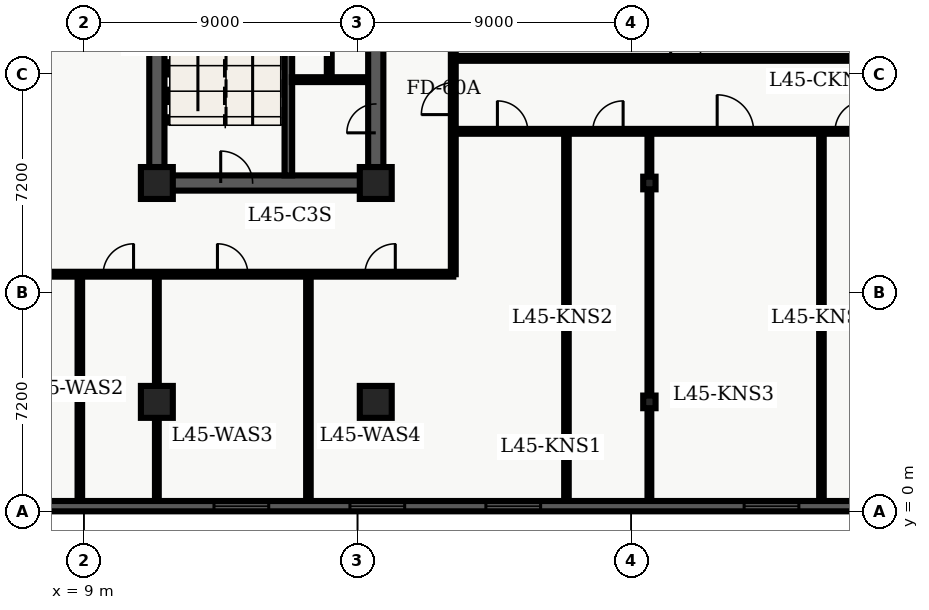
"""IFC4 building model, lengths in metres.
Left out: names, types, materials, properties, quantities, classifications, styles, units other than length and angle.
Written with IfcOpenShell. Run it as: python <this file> out.ifc"""

import sys

from ifc_helpers import new_model, entity, si_unit, converted_unit, direction, frame, origin_with_axes, origin_2d_with_axis, place, context, subcontext, project, spatial, polyline, rectangle, i_section, outline, extrude, element, fill, save


model = new_model("IFC4")
c1 = context("Model", 3, precision=1e-05, world=origin_with_axes(), true_north=direction((0.0, 1.0)))
c2 = subcontext(c1, "Body", "Model", "MODEL_VIEW")
j1 = project(units=[si_unit("LENGTHUNIT", "METRE"), converted_unit("PLANEANGLEUNIT", "DEGREE", entity("IfcPlaneAngleMeasure", 0.017), si_unit("PLANEANGLEUNIT", "RADIAN"), dimensions=[0, 0, 0, 0, 0, 0, 0])], contexts=[c1])
p1 = place(None, origin_with_axes())
s1 = spatial("IfcSite", under=j1, at=p1, CompositionType="ELEMENT")
p2 = place(p1, origin_with_axes())
s2 = spatial("IfcBuilding", under=s1, at=p2, CompositionType="ELEMENT")
p3 = place(p2, frame((0.0, 0.0, 183.6), z_axis=(0.0, 0.0, 1.0), x_axis=(1.0, 0.0, 0.0)))
s3 = spatial("IfcBuildingStorey", under=s2, at=p3, CompositionType="ELEMENT", Elevation=183.6)
p4 = place(p3, frame((11.4, 10.8, 0.0), z_axis=(0.0, 0.0, 1.0), x_axis=(0.0, 1.0, 0.0)))
e1 = element("IfcWall", 1, at=p4, inside=s3, PredefinedType="SHEAR", context=c2, shape_type="SweptSolid", body=[
    extrude(outline(polyline([(0.0, -0.25), (27.0, -0.25), (27.0, 0.25), (0.0, 0.25), (0.0, -0.25)])), origin_with_axes(), (0.0, 0.0, 1.0), 3.6),
])
p5 = place(p3, frame((11.4, 10.8, 0.0), z_axis=(0.0, 0.0, 1.0), x_axis=(1.0, 0.0, 0.0)))
e2 = element("IfcWall", 2, at=p5, inside=s3, PredefinedType="SHEAR", context=c2, shape_type="SweptSolid", body=[
    extrude(outline(polyline([(0.0, -0.25), (7.2, -0.25), (7.2, 0.25), (0.0, 0.25), (0.0, -0.25)])), origin_with_axes(), (0.0, 0.0, 1.0), 3.6),
])
p6 = place(p5, frame((2.625, 0.0, 0.0), z_axis=(0.0, 0.0, 1.0), x_axis=(1.0, 0.0, 0.0)))
e3 = element("IfcOpeningElement", 3, at=p6, cuts=e2, PredefinedType="OPENING", context=c2, shape_type="SweptSolid", body=[
    extrude(rectangle(XDim=1.05, YDim=0.52, at=origin_2d_with_axis()), origin_with_axes(), (0.0, 0.0, 1.0), 2.15),
])
p7 = place(p3, frame((18.6, 10.8, 0.0), z_axis=(0.0, 0.0, 1.0), x_axis=(0.0, 1.0, 0.0)))
e4 = element("IfcWall", 4, at=p7, inside=s3, PredefinedType="SHEAR", context=c2, shape_type="SweptSolid", body=[
    extrude(outline(polyline([(0.0, -0.25), (13.5, -0.25), (13.5, 0.25), (0.0, 0.25), (0.0, -0.25)])), origin_with_axes(), (0.0, 0.0, 1.0), 3.6),
])
p8 = place(p7, frame((11.125, 0.0, 0.0), z_axis=(0.0, 0.0, 1.0), x_axis=(1.0, 0.0, 0.0)))
e5 = element("IfcOpeningElement", 5, at=p8, cuts=e4, PredefinedType="OPENING", context=c2, shape_type="SweptSolid", body=[
    extrude(rectangle(XDim=1.05, YDim=0.52, at=origin_2d_with_axis()), origin_with_axes(), (0.0, 0.0, 1.0), 2.15),
])
p9 = place(p7, frame((2.125, 0.0, 0.0), z_axis=(0.0, 0.0, 1.0), x_axis=(1.0, 0.0, 0.0)))
e6 = element("IfcOpeningElement", 6, at=p9, cuts=e4, PredefinedType="OPENING", context=c2, shape_type="SweptSolid", body=[
    extrude(rectangle(XDim=0.95, YDim=0.52, at=origin_2d_with_axis()), origin_with_axes(), (0.0, 0.0, 1.0), 2.15),
])
p10 = place(p7, frame((6.275, 0.0, 0.0), z_axis=(0.0, 0.0, 1.0), x_axis=(1.0, 0.0, 0.0)))
e7 = element("IfcOpeningElement", 7, at=p10, cuts=e4, PredefinedType="OPENING", context=c2, shape_type="SweptSolid", body=[
    extrude(rectangle(XDim=0.95, YDim=0.52, at=origin_2d_with_axis()), origin_with_axes(), (0.0, 0.0, 1.0), 2.15),
])
p11 = place(p3, frame((15.725, 11.05, 0.0), z_axis=(0.0, 0.0, 1.0), x_axis=(0.0, 1.0, 0.0)))
e8 = element("IfcWall", 8, at=p11, inside=s3, PredefinedType="SHEAR", context=c2, shape_type="SweptSolid", body=[
    extrude(outline(polyline([(0.0, -0.125), (8.65, -0.125), (8.65, 0.125), (0.0, 0.125), (0.0, -0.125)])), origin_with_axes(), (0.0, 0.0, 1.0), 3.6),
])
for number, where, z_axis, x_axis in (
    (9, (11.4, 3.6, 0.0), (0.0, 0.0, 1.0), (1.0, 0.0, 0.0)),
    (10, (11.4, 10.8, 0.0), (0.0, 0.0, 1.0), (1.0, 0.0, 0.0)),
    (11, (18.6, 3.6, 0.0), (0.0, 0.0, 1.0), (1.0, 0.0, 0.0)),
    (12, (18.6, 10.8, 0.0), (0.0, 0.0, 1.0), (1.0, 0.0, 0.0)),
):
    element("IfcColumn", number, at=place(p3, frame(where, z_axis=z_axis, x_axis=x_axis)), inside=s3, PredefinedType="COLUMN", context=c2, shape_type="SweptSolid", body=[
        extrude(rectangle(XDim=1.05, YDim=1.05, at=origin_2d_with_axis()), origin_with_axes(), (0.0, 0.0, 1.0), 3.9),
    ])
for number, where, z_axis, x_axis in (
    (13, (27.6, 3.6, 0.0), (0.0, 0.0, 1.0), (1.0, 0.0, 0.0)),
    (14, (27.6, 10.8, 0.0), (0.0, 0.0, 1.0), (1.0, 0.0, 0.0)),
):
    element("IfcColumn", number, at=place(p3, frame(where, z_axis=z_axis, x_axis=x_axis)), inside=s3, PredefinedType="COLUMN", context=c2, shape_type="SweptSolid", body=[
        extrude(i_section(OverallWidth=0.406, OverallDepth=0.416, WebThickness=0.03, FlangeThickness=0.048, FilletRadius=0.022, at=origin_2d_with_axis()), origin_with_axes(), (0.0, 0.0, 1.0), 3.9),
    ])
p12 = place(p3, frame((15.84, 14.2, 0.0), z_axis=(0.0, 0.0, 1.0), x_axis=(1.0, 0.0, 0.0)))
e15 = element("IfcWall", 15, at=p12, inside=s3, PredefinedType="PARTITIONING", context=c2, shape_type="SweptSolid", body=[
    extrude(outline(polyline([(0.0, -0.08), (2.46, -0.08), (2.46, 0.08), (0.0, 0.08), (0.0, -0.08)])), origin_with_axes(), (0.0, 0.0, 1.0), 2.64),
])
p13 = place(p3, frame((17.07, 14.28, 0.0), z_axis=(0.0, 0.0, 1.0), x_axis=(0.0, 1.0, 0.0)))
e16 = element("IfcWall", 16, at=p13, inside=s3, PredefinedType="PARTITIONING", context=c2, shape_type="SweptSolid", body=[
    extrude(outline(polyline([(0.0, -0.08), (5.42, -0.08), (5.42, 0.08), (0.0, 0.08), (0.0, -0.08)])), origin_with_axes(), (0.0, 0.0, 1.0), 2.64),
])
p14 = place(p13, frame((2.6, 0.0, 0.0), z_axis=(0.0, 0.0, 1.0), x_axis=(1.0, 0.0, 0.0)))
e17 = element("IfcOpeningElement", 17, at=p14, cuts=e16, PredefinedType="OPENING", context=c2, shape_type="SweptSolid", body=[
    extrude(rectangle(XDim=0.9, YDim=0.18, at=origin_2d_with_axis()), origin_with_axes(), (0.0, 0.0, 1.0), 2.15),
])
p15 = place(p3, frame((2.6, 7.8, 0.0), z_axis=(0.0, 0.0, 1.0), x_axis=(1.0, 0.0, 0.0)))
e18 = element("IfcWall", 18, at=p15, inside=s3, PredefinedType="PARTITIONING", context=c2, shape_type="SweptSolid", body=[
    extrude(outline(polyline([(0.0, -0.08), (18.55, -0.08), (18.55, 0.08), (0.0, 0.08), (0.0, -0.08)])), origin_with_axes(), (0.0, 0.0, 1.0), 2.64),
])
p16 = place(p15, frame((2.569, 0.0, 0.0), z_axis=(0.0, 0.0, 1.0), x_axis=(1.0, 0.0, 0.0)))
e19 = element("IfcOpeningElement", 19, at=p16, cuts=e18, PredefinedType="OPENING", context=c2, shape_type="SweptSolid", body=[
    extrude(rectangle(XDim=1.0, YDim=0.18, at=origin_2d_with_axis()), origin_with_axes(), (0.0, 0.0, 1.0), 2.15),
])
p17 = place(p15, frame((7.534, 0.0, 0.0), z_axis=(0.0, 0.0, 1.0), x_axis=(1.0, 0.0, 0.0)))
e20 = element("IfcOpeningElement", 20, at=p17, cuts=e18, PredefinedType="OPENING", context=c2, shape_type="SweptSolid", body=[
    extrude(rectangle(XDim=1.0, YDim=0.18, at=origin_2d_with_axis()), origin_with_axes(), (0.0, 0.0, 1.0), 2.15),
])
p18 = place(p15, frame((11.293, 0.0, 0.0), z_axis=(0.0, 0.0, 1.0), x_axis=(1.0, 0.0, 0.0)))
e21 = element("IfcOpeningElement", 21, at=p18, cuts=e18, PredefinedType="OPENING", context=c2, shape_type="SweptSolid", body=[
    extrude(rectangle(XDim=1.0, YDim=0.18, at=origin_2d_with_axis()), origin_with_axes(), (0.0, 0.0, 1.0), 2.15),
])
p19 = place(p15, frame((16.142, 0.0, 0.0), z_axis=(0.0, 0.0, 1.0), x_axis=(1.0, 0.0, 0.0)))
e22 = element("IfcOpeningElement", 22, at=p19, cuts=e18, PredefinedType="OPENING", context=c2, shape_type="SweptSolid", body=[
    extrude(rectangle(XDim=1.0, YDim=0.18, at=origin_2d_with_axis()), origin_with_axes(), (0.0, 0.0, 1.0), 2.15),
])
p20 = place(p3, frame((21.15, 7.8, 0.0), z_axis=(0.0, 0.0, 1.0), x_axis=(0.0, 1.0, 0.0)))
e23 = element("IfcWall", 23, at=p20, inside=s3, PredefinedType="PARTITIONING", context=c2, shape_type="SweptSolid", body=[
    extrude(outline(polyline([(0.0, -0.08), (32.7, -0.08), (32.7, 0.08), (0.0, 0.08), (0.0, -0.08)])), origin_with_axes(), (0.0, 0.0, 1.0), 2.64),
])
p21 = place(p20, frame((16.456, 0.0, 0.0), z_axis=(0.0, 0.0, 1.0), x_axis=(1.0, 0.0, 0.0)))
e24 = element("IfcOpeningElement", 24, at=p21, cuts=e23, PredefinedType="OPENING", context=c2, shape_type="SweptSolid", body=[
    extrude(rectangle(XDim=1.0, YDim=0.18, at=origin_2d_with_axis()), origin_with_axes(), (0.0, 0.0, 1.0), 2.15),
])
p22 = place(p20, frame((22.009, 0.0, 0.0), z_axis=(0.0, 0.0, 1.0), x_axis=(1.0, 0.0, 0.0)))
e25 = element("IfcOpeningElement", 25, at=p22, cuts=e23, PredefinedType="OPENING", context=c2, shape_type="SweptSolid", body=[
    extrude(rectangle(XDim=1.0, YDim=0.18, at=origin_2d_with_axis()), origin_with_axes(), (0.0, 0.0, 1.0), 2.15),
])
p23 = place(p20, frame((28.803, 0.0, 0.0), z_axis=(0.0, 0.0, 1.0), x_axis=(1.0, 0.0, 0.0)))
e26 = element("IfcOpeningElement", 26, at=p23, cuts=e23, PredefinedType="OPENING", context=c2, shape_type="SweptSolid", body=[
    extrude(rectangle(XDim=1.0, YDim=0.18, at=origin_2d_with_axis()), origin_with_axes(), (0.0, 0.0, 1.0), 2.15),
])
p24 = place(p20, frame((5.775, 0.0, 0.0), z_axis=(0.0, 0.0, 1.0), x_axis=(1.0, 0.0, 0.0)))
e27 = element("IfcOpeningElement", 27, at=p24, cuts=e23, PredefinedType="OPENING", context=c2, shape_type="SweptSolid", body=[
    extrude(rectangle(XDim=1.05, YDim=0.18, at=origin_2d_with_axis()), origin_with_axes(), (0.0, 0.0, 1.0), 2.15),
])
p25 = place(p3, frame((8.867, 0.335, 0.0), z_axis=(0.0, 0.0, 1.0), x_axis=(0.0, 1.0, 0.0)))
e28 = element("IfcWall", 28, at=p25, inside=s3, PredefinedType="PARTITIONING", context=c2, shape_type="SweptSolid", body=[
    extrude(outline(polyline([(0.0, -0.075), (7.365, -0.075), (7.365, 0.075), (0.0, 0.075), (0.0, -0.075)])), origin_with_axes(), (0.0, 0.0, 1.0), 2.64),
])
p26 = place(p3, frame((11.4, 0.335, 0.0), z_axis=(0.0, 0.0, 1.0), x_axis=(0.0, 1.0, 0.0)))
e29 = element("IfcWall", 29, at=p26, inside=s3, PredefinedType="PARTITIONING", context=c2, shape_type="SweptSolid", body=[
    extrude(outline(polyline([(0.0, -0.062), (7.365, -0.062), (7.365, 0.062), (0.0, 0.062), (0.0, -0.062)])), origin_with_axes(), (0.0, 0.0, 1.0), 2.64),
])
p27 = place(p3, frame((16.385, 0.335, 0.0), z_axis=(0.0, 0.0, 1.0), x_axis=(0.0, 1.0, 0.0)))
e30 = element("IfcWall", 30, at=p27, inside=s3, PredefinedType="PARTITIONING", context=c2, shape_type="SweptSolid", body=[
    extrude(outline(polyline([(0.0, -0.075), (7.365, -0.075), (7.365, 0.075), (0.0, 0.075), (0.0, -0.075)])), origin_with_axes(), (0.0, 0.0, 1.0), 2.64),
])
p28 = place(p3, frame((21.15, 12.5, 0.0), z_axis=(0.0, 0.0, 1.0), x_axis=(1.0, 0.0, 0.0)))
e31 = element("IfcWall", 31, at=p28, inside=s3, PredefinedType="PARTITIONING", context=c2, shape_type="SweptSolid", body=[
    extrude(outline(polyline([(0.0, -0.08), (15.2, -0.08), (15.2, 0.08), (0.0, 0.08), (0.0, -0.08)])), origin_with_axes(), (0.0, 0.0, 1.0), 2.64),
])
p29 = place(p28, frame((1.951, 0.0, 0.0), z_axis=(0.0, 0.0, 1.0), x_axis=(1.0, 0.0, 0.0)))
e32 = element("IfcOpeningElement", 32, at=p29, cuts=e31, PredefinedType="OPENING", context=c2, shape_type="SweptSolid", body=[
    extrude(rectangle(XDim=1.0, YDim=0.18, at=origin_2d_with_axis()), origin_with_axes(), (0.0, 0.0, 1.0), 2.15),
])
p30 = place(p28, frame((5.086, 0.0, 0.0), z_axis=(0.0, 0.0, 1.0), x_axis=(1.0, 0.0, 0.0)))
e33 = element("IfcOpeningElement", 33, at=p30, cuts=e31, PredefinedType="OPENING", context=c2, shape_type="SweptSolid", body=[
    extrude(rectangle(XDim=1.0, YDim=0.18, at=origin_2d_with_axis()), origin_with_axes(), (0.0, 0.0, 1.0), 2.15),
])
p31 = place(p28, frame((9.28, 0.0, 0.0), z_axis=(0.0, 0.0, 1.0), x_axis=(1.0, 0.0, 0.0)))
e34 = element("IfcOpeningElement", 34, at=p31, cuts=e31, PredefinedType="OPENING", context=c2, shape_type="SweptSolid", body=[
    extrude(rectangle(XDim=1.2, YDim=0.18, at=origin_2d_with_axis()), origin_with_axes(), (0.0, 0.0, 1.0), 2.2),
])
p32 = place(p28, frame((13.055, 0.0, 0.0), z_axis=(0.0, 0.0, 1.0), x_axis=(1.0, 0.0, 0.0)))
e35 = element("IfcOpeningElement", 35, at=p32, cuts=e31, PredefinedType="OPENING", context=c2, shape_type="SweptSolid", body=[
    extrude(rectangle(XDim=1.0, YDim=0.18, at=origin_2d_with_axis()), origin_with_axes(), (0.0, 0.0, 1.0), 2.15),
])
p33 = place(p3, frame((21.15, 14.9, 0.0), z_axis=(0.0, 0.0, 1.0), x_axis=(1.0, 0.0, 0.0)))
e36 = element("IfcWall", 36, at=p33, inside=s3, PredefinedType="PARTITIONING", context=c2, shape_type="SweptSolid", body=[
    extrude(outline(polyline([(0.0, -0.08), (15.2, -0.08), (15.2, 0.08), (0.0, 0.08), (0.0, -0.08)])), origin_with_axes(), (0.0, 0.0, 1.0), 2.64),
])
p34 = place(p33, frame((7.65, 0.0, 0.0), z_axis=(0.0, 0.0, 1.0), x_axis=(1.0, 0.0, 0.0)))
e37 = element("IfcOpeningElement", 37, at=p34, cuts=e36, PredefinedType="OPENING", context=c2, shape_type="SweptSolid", body=[
    extrude(rectangle(XDim=1.0, YDim=0.18, at=origin_2d_with_axis()), origin_with_axes(), (0.0, 0.0, 1.0), 2.15),
])
p35 = place(p3, frame((24.872, 0.335, 0.0), z_axis=(0.0, 0.0, 1.0), x_axis=(0.0, 1.0, 0.0)))
e38 = element("IfcWall", 38, at=p35, inside=s3, PredefinedType="PARTITIONING", context=c2, shape_type="SweptSolid", body=[
    extrude(outline(polyline([(0.0, -0.075), (12.045, -0.075), (12.045, 0.075), (0.0, 0.075), (0.0, -0.075)])), origin_with_axes(), (0.0, 0.0, 1.0), 2.64),
])
p36 = place(p3, frame((27.6, 0.335, 0.0), z_axis=(0.0, 0.0, 1.0), x_axis=(0.0, 1.0, 0.0)))
e39 = element("IfcWall", 39, at=p36, inside=s3, PredefinedType="PARTITIONING", context=c2, shape_type="SweptSolid", body=[
    extrude(outline(polyline([(0.0, -0.062), (12.045, -0.062), (12.045, 0.062), (0.0, 0.062), (0.0, -0.062)])), origin_with_axes(), (0.0, 0.0, 1.0), 2.64),
])
p37 = place(p3, frame((33.259, 0.335, 0.0), z_axis=(0.0, 0.0, 1.0), x_axis=(0.0, 1.0, 0.0)))
e40 = element("IfcWall", 40, at=p37, inside=s3, PredefinedType="PARTITIONING", context=c2, shape_type="SweptSolid", body=[
    extrude(outline(polyline([(0.0, -0.075), (12.045, -0.075), (12.045, 0.075), (0.0, 0.075), (0.0, -0.075)])), origin_with_axes(), (0.0, 0.0, 1.0), 2.64),
])
p38 = place(p3, frame((57.26, 0.17, 0.0), z_axis=(0.0, 0.0, 1.0), x_axis=(-1.0, 0.0, 0.0)))
e41 = element("IfcWall", 41, at=p38, inside=s3, PredefinedType="SOLIDWALL", context=c2, shape_type="SweptSolid", body=[
    extrude(outline(polyline([(0.0, -0.17), (54.86, -0.17), (54.86, 0.17), (0.0, 0.17), (0.0, -0.17)])), origin_with_axes(), (0.0, 0.0, 1.0), 3.6),
])
p39 = place(p38, frame((2.836, 0.0, 0.45), z_axis=(0.0, 0.0, 1.0), x_axis=(1.0, 0.0, 0.0)))
e42 = element("IfcOpeningElement", 42, at=p39, cuts=e41, PredefinedType="OPENING", context=c2, shape_type="SweptSolid", body=[
    extrude(rectangle(XDim=1.8, YDim=0.36, at=origin_2d_with_axis()), origin_with_axes(), (0.0, 0.0, 1.0), 2.1),
])
p40 = place(p38, frame((7.307, 0.0, 0.45), z_axis=(0.0, 0.0, 1.0), x_axis=(1.0, 0.0, 0.0)))
e43 = element("IfcOpeningElement", 43, at=p40, cuts=e41, PredefinedType="OPENING", context=c2, shape_type="SweptSolid", body=[
    extrude(rectangle(XDim=1.8, YDim=0.36, at=origin_2d_with_axis()), origin_with_axes(), (0.0, 0.0, 1.0), 2.1),
])
p41 = place(p38, frame((11.779, 0.0, 0.45), z_axis=(0.0, 0.0, 1.0), x_axis=(1.0, 0.0, 0.0)))
e44 = element("IfcOpeningElement", 44, at=p41, cuts=e41, PredefinedType="OPENING", context=c2, shape_type="SweptSolid", body=[
    extrude(rectangle(XDim=1.8, YDim=0.36, at=origin_2d_with_axis()), origin_with_axes(), (0.0, 0.0, 1.0), 2.1),
])
p42 = place(p38, frame((16.251, 0.0, 0.45), z_axis=(0.0, 0.0, 1.0), x_axis=(1.0, 0.0, 0.0)))
e45 = element("IfcOpeningElement", 45, at=p42, cuts=e41, PredefinedType="OPENING", context=c2, shape_type="SweptSolid", body=[
    extrude(rectangle(XDim=1.8, YDim=0.36, at=origin_2d_with_axis()), origin_with_axes(), (0.0, 0.0, 1.0), 2.1),
])
p43 = place(p38, frame((20.723, 0.0, 0.45), z_axis=(0.0, 0.0, 1.0), x_axis=(1.0, 0.0, 0.0)))
e46 = element("IfcOpeningElement", 46, at=p43, cuts=e41, PredefinedType="OPENING", context=c2, shape_type="SweptSolid", body=[
    extrude(rectangle(XDim=1.8, YDim=0.36, at=origin_2d_with_axis()), origin_with_axes(), (0.0, 0.0, 1.0), 2.1),
])
p44 = place(p38, frame((25.644, 0.0, 0.45), z_axis=(0.0, 0.0, 1.0), x_axis=(1.0, 0.0, 0.0)))
e47 = element("IfcOpeningElement", 47, at=p44, cuts=e41, PredefinedType="OPENING", context=c2, shape_type="SweptSolid", body=[
    extrude(rectangle(XDim=1.8, YDim=0.36, at=origin_2d_with_axis()), origin_with_axes(), (0.0, 0.0, 1.0), 2.1),
])
p45 = place(p38, frame((34.138, 0.0, 0.45), z_axis=(0.0, 0.0, 1.0), x_axis=(1.0, 0.0, 0.0)))
e48 = element("IfcOpeningElement", 48, at=p45, cuts=e41, PredefinedType="OPENING", context=c2, shape_type="SweptSolid", body=[
    extrude(rectangle(XDim=1.8, YDim=0.36, at=origin_2d_with_axis()), origin_with_axes(), (0.0, 0.0, 1.0), 2.1),
])
p46 = place(p38, frame((38.609, 0.0, 0.45), z_axis=(0.0, 0.0, 1.0), x_axis=(1.0, 0.0, 0.0)))
e49 = element("IfcOpeningElement", 49, at=p46, cuts=e41, PredefinedType="OPENING", context=c2, shape_type="SweptSolid", body=[
    extrude(rectangle(XDim=1.8, YDim=0.36, at=origin_2d_with_axis()), origin_with_axes(), (0.0, 0.0, 1.0), 2.1),
])
p47 = place(p38, frame((43.081, 0.0, 0.45), z_axis=(0.0, 0.0, 1.0), x_axis=(1.0, 0.0, 0.0)))
e50 = element("IfcOpeningElement", 50, at=p47, cuts=e41, PredefinedType="OPENING", context=c2, shape_type="SweptSolid", body=[
    extrude(rectangle(XDim=1.8, YDim=0.36, at=origin_2d_with_axis()), origin_with_axes(), (0.0, 0.0, 1.0), 2.1),
])
p48 = place(p38, frame((52.024, 0.0, 0.45), z_axis=(0.0, 0.0, 1.0), x_axis=(1.0, 0.0, 0.0)))
e51 = element("IfcOpeningElement", 51, at=p48, cuts=e41, PredefinedType="OPENING", context=c2, shape_type="SweptSolid", body=[
    extrude(rectangle(XDim=1.8, YDim=0.36, at=origin_2d_with_axis()), origin_with_axes(), (0.0, 0.0, 1.0), 2.1),
])
p49 = place(p5, frame((2.625, 0.0, 0.0), z_axis=(0.0, 0.0, 1.0), x_axis=(1.0, 0.0, 0.0)))
e52 = element("IfcDoor", 52, at=p49, inside=s3, OperationType="SINGLE_SWING_LEFT", PredefinedType="DOOR", context=c2, shape_type="SweptSolid", body=[
    extrude(rectangle(XDim=1.05, YDim=0.09, at=origin_2d_with_axis()), origin_with_axes(), (0.0, 0.0, 1.0), 2.15),
])
fill(e3, e52)
p50 = place(p7, frame((2.125, 0.0, 0.0), z_axis=(0.0, 0.0, 1.0), x_axis=(1.0, 0.0, 0.0)))
e53 = element("IfcDoor", 53, at=p50, inside=s3, OperationType="SINGLE_SWING_LEFT", PredefinedType="DOOR", context=c2, shape_type="SweptSolid", body=[
    extrude(rectangle(XDim=0.95, YDim=0.09, at=origin_2d_with_axis()), origin_with_axes(), (0.0, 0.0, 1.0), 2.15),
])
fill(e6, e53)
p51 = place(p15, frame((7.534, 0.0, 0.0), z_axis=(0.0, 0.0, 1.0), x_axis=(1.0, 0.0, 0.0)))
e54 = element("IfcDoor", 54, at=p51, inside=s3, OperationType="SINGLE_SWING_RIGHT", PredefinedType="DOOR", context=c2, shape_type="SweptSolid", body=[
    extrude(rectangle(XDim=1.0, YDim=0.09, at=origin_2d_with_axis()), origin_with_axes(), (0.0, 0.0, 1.0), 2.15),
])
fill(e20, e54)
p52 = place(p15, frame((11.293, 0.0, 0.0), z_axis=(0.0, 0.0, 1.0), x_axis=(1.0, 0.0, 0.0)))
e55 = element("IfcDoor", 55, at=p52, inside=s3, OperationType="SINGLE_SWING_LEFT", PredefinedType="DOOR", context=c2, shape_type="SweptSolid", body=[
    extrude(rectangle(XDim=1.0, YDim=0.09, at=origin_2d_with_axis()), origin_with_axes(), (0.0, 0.0, 1.0), 2.15),
])
fill(e21, e55)
p53 = place(p15, frame((16.142, 0.0, 0.0), z_axis=(0.0, 0.0, 1.0), x_axis=(1.0, 0.0, 0.0)))
e56 = element("IfcDoor", 56, at=p53, inside=s3, OperationType="SINGLE_SWING_RIGHT", PredefinedType="DOOR", context=c2, shape_type="SweptSolid", body=[
    extrude(rectangle(XDim=1.0, YDim=0.09, at=origin_2d_with_axis()), origin_with_axes(), (0.0, 0.0, 1.0), 2.15),
])
fill(e22, e56)
p54 = place(p20, frame((5.775, 0.0, 0.0), z_axis=(0.0, 0.0, 1.0), x_axis=(1.0, 0.0, 0.0)))
e57 = element("IfcDoor", 57, at=p54, inside=s3, OperationType="SINGLE_SWING_LEFT", PredefinedType="DOOR", context=c2, shape_type="SweptSolid", body=[
    extrude(rectangle(XDim=1.05, YDim=0.09, at=origin_2d_with_axis()), origin_with_axes(), (0.0, 0.0, 1.0), 2.15),
])
fill(e27, e57)
p55 = place(p28, frame((1.951, 0.0, 0.0), z_axis=(0.0, 0.0, 1.0), x_axis=(1.0, 0.0, 0.0)))
e58 = element("IfcDoor", 58, at=p55, inside=s3, OperationType="SINGLE_SWING_LEFT", PredefinedType="DOOR", context=c2, shape_type="SweptSolid", body=[
    extrude(rectangle(XDim=1.0, YDim=0.09, at=origin_2d_with_axis()), origin_with_axes(), (0.0, 0.0, 1.0), 2.15),
])
fill(e32, e58)
p56 = place(p28, frame((5.086, 0.0, 0.0), z_axis=(0.0, 0.0, 1.0), x_axis=(1.0, 0.0, 0.0)))
e59 = element("IfcDoor", 59, at=p56, inside=s3, OperationType="SINGLE_SWING_RIGHT", PredefinedType="DOOR", context=c2, shape_type="SweptSolid", body=[
    extrude(rectangle(XDim=1.0, YDim=0.09, at=origin_2d_with_axis()), origin_with_axes(), (0.0, 0.0, 1.0), 2.15),
])
fill(e33, e59)
p57 = place(p28, frame((9.28, 0.0, 0.0), z_axis=(0.0, 0.0, 1.0), x_axis=(1.0, 0.0, 0.0)))
e60 = element("IfcDoor", 60, at=p57, inside=s3, OperationType="SINGLE_SWING_LEFT", PredefinedType="DOOR", context=c2, shape_type="SweptSolid", body=[
    extrude(rectangle(XDim=1.2, YDim=0.09, at=origin_2d_with_axis()), origin_with_axes(), (0.0, 0.0, 1.0), 2.2),
])
fill(e34, e60)
p58 = place(p28, frame((13.055, 0.0, 0.0), z_axis=(0.0, 0.0, 1.0), x_axis=(1.0, 0.0, 0.0)))
e61 = element("IfcDoor", 61, at=p58, inside=s3, OperationType="SINGLE_SWING_RIGHT", PredefinedType="DOOR", context=c2, shape_type="SweptSolid", body=[
    extrude(rectangle(XDim=1.0, YDim=0.09, at=origin_2d_with_axis()), origin_with_axes(), (0.0, 0.0, 1.0), 2.15),
])
fill(e35, e61)
p59 = place(p33, frame((7.65, 0.0, 0.0), z_axis=(0.0, 0.0, 1.0), x_axis=(1.0, 0.0, 0.0)))
e62 = element("IfcDoor", 62, at=p59, inside=s3, OperationType="SINGLE_SWING_LEFT", PredefinedType="DOOR", context=c2, shape_type="SweptSolid", body=[
    extrude(rectangle(XDim=1.0, YDim=0.09, at=origin_2d_with_axis()), origin_with_axes(), (0.0, 0.0, 1.0), 2.15),
])
fill(e37, e62)
p60 = place(p38, frame((25.644, 0.0, 0.45), z_axis=(0.0, 0.0, 1.0), x_axis=(1.0, 0.0, 0.0)))
e63 = element("IfcWindow", 63, at=p60, inside=s3, PredefinedType="WINDOW", context=c2, shape_type="SweptSolid", body=[
    extrude(rectangle(XDim=1.8, YDim=0.09, at=origin_2d_with_axis()), origin_with_axes(), (0.0, 0.0, 1.0), 2.1),
])
fill(e47, e63)
p61 = place(p38, frame((34.138, 0.0, 0.45), z_axis=(0.0, 0.0, 1.0), x_axis=(1.0, 0.0, 0.0)))
e64 = element("IfcWindow", 64, at=p61, inside=s3, PredefinedType="WINDOW", context=c2, shape_type="SweptSolid", body=[
    extrude(rectangle(XDim=1.8, YDim=0.09, at=origin_2d_with_axis()), origin_with_axes(), (0.0, 0.0, 1.0), 2.1),
])
fill(e48, e64)
p62 = place(p38, frame((38.609, 0.0, 0.45), z_axis=(0.0, 0.0, 1.0), x_axis=(1.0, 0.0, 0.0)))
e65 = element("IfcWindow", 65, at=p62, inside=s3, PredefinedType="WINDOW", context=c2, shape_type="SweptSolid", body=[
    extrude(rectangle(XDim=1.8, YDim=0.09, at=origin_2d_with_axis()), origin_with_axes(), (0.0, 0.0, 1.0), 2.1),
])
fill(e49, e65)
p63 = place(p38, frame((43.081, 0.0, 0.45), z_axis=(0.0, 0.0, 1.0), x_axis=(1.0, 0.0, 0.0)))
e66 = element("IfcWindow", 66, at=p63, inside=s3, PredefinedType="WINDOW", context=c2, shape_type="SweptSolid", body=[
    extrude(rectangle(XDim=1.8, YDim=0.09, at=origin_2d_with_axis()), origin_with_axes(), (0.0, 0.0, 1.0), 2.1),
])
fill(e50, e66)
save(model, sys.argv[1])
